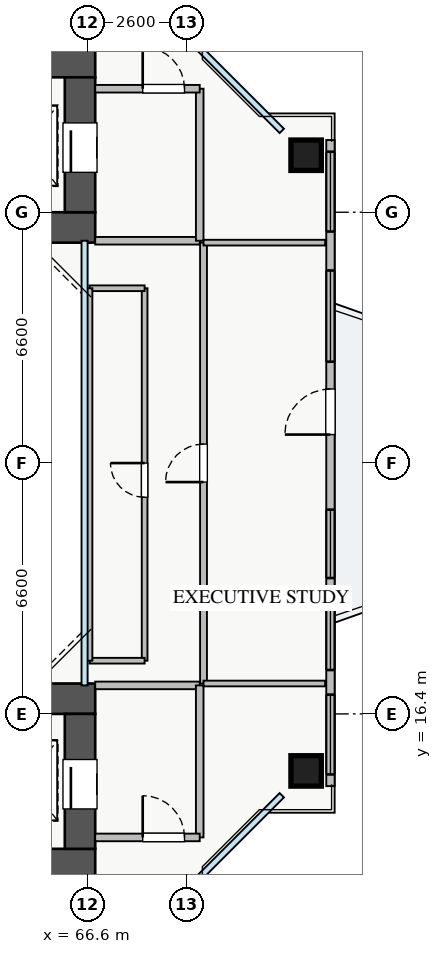
"""IFC4 building model, lengths in metres.
Left out: names, types, materials, properties, quantities, classifications, styles, units other than length and angle.
Written with IfcOpenShell. Run it as: python <this file> out.ifc"""

import sys

from ifc_helpers import new_model, si_unit, direction, frame, frame_2d, origin, origin_2d, place, context, subcontext, project, spatial, rectangle, extrude, source, transform, mapped, element, fill, save


model = new_model("IFC4")
c1 = context("Model", 3, precision=1e-05, world=origin(), true_north=direction((0.0, 1.0)))
c2 = subcontext(c1, "Body", "Model", "MODEL_VIEW")
j1 = project(units=[si_unit("LENGTHUNIT", "METRE"), si_unit("PLANEANGLEUNIT", "RADIAN")], contexts=[c1])
p1 = place(None, origin())
s1 = spatial("IfcSite", under=j1, at=p1, CompositionType="ELEMENT")
p2 = place(p1, origin())
s2 = spatial("IfcBuilding", under=s1, at=p2, CompositionType="ELEMENT")
p3 = place(p2, frame((0.0, 0.0, 106.75)))
s3 = spatial("IfcBuildingStorey", under=s2, at=p3, CompositionType="ELEMENT", Elevation=106.75)
p4 = place(p3, frame((54.2, 29.2, 0.0), z_axis=(0.0, 0.0, 1.0), x_axis=(1.0, 0.0, 0.0)))
e1 = element("IfcWall", 1, at=p4, inside=s3, PredefinedType="SHEAR", context=c2, shape_type="SweptSolid", body=[
    extrude(rectangle(XDim=12.6, YDim=0.8, at=frame_2d((6.3, 0.0))), origin(), (0.0, 0.0, 1.0), 3.25),
])
p5 = place(p3, frame((54.2, 33.55, 0.0), z_axis=(0.0, 0.0, 1.0), x_axis=(1.0, 0.0, 0.0)))
e2 = element("IfcWall", 2, at=p5, inside=s3, PredefinedType="SHEAR", context=c2, shape_type="SweptSolid", body=[
    extrude(rectangle(XDim=12.6, YDim=0.8, at=frame_2d((6.3, 0.0))), origin(), (0.0, 0.0, 1.0), 3.25),
])
p6 = place(p5, frame((8.2, 0.0, 0.0)))
e3 = element("IfcOpeningElement", 3, at=p6, cuts=e2, PredefinedType="OPENING", context=c2, shape_type="SweptSolid", body=[
    extrude(rectangle(XDim=1.1, YDim=2.05, at=frame_2d((0.55, 1.025))), frame((0.0, 0.41, 0.0), z_axis=(0.0, -1.0, 0.0), x_axis=(1.0, 0.0, 0.0)), (0.0, 0.0, 1.0), 0.82),
])
p7 = place(p3, frame((66.4, 29.6, 0.0), z_axis=(0.0, 0.0, 1.0), x_axis=(0.0, 1.0, 0.0)))
e4 = element("IfcWall", 4, at=p7, inside=s3, PredefinedType="SHEAR", context=c2, shape_type="SweptSolid", body=[
    extrude(rectangle(XDim=3.55, YDim=0.8, at=frame_2d((1.775, 0.0))), origin(), (0.0, 0.0, 1.0), 3.25),
])
p8 = place(p7, frame((1.05, 0.0, 0.0)))
e5 = element("IfcOpeningElement", 5, at=p8, cuts=e4, PredefinedType="OPENING", context=c2, shape_type="SweptSolid", body=[
    extrude(rectangle(XDim=1.3, YDim=2.05, at=frame_2d((0.65, 1.025))), frame((0.0, 0.41, 0.0), z_axis=(0.0, -1.0, 0.0), x_axis=(1.0, 0.0, 0.0)), (0.0, 0.0, 1.0), 0.82),
])
p9 = place(p3, frame((54.2, 12.45, 0.0), z_axis=(0.0, 0.0, 1.0), x_axis=(1.0, 0.0, 0.0)))
e6 = element("IfcWall", 6, at=p9, inside=s3, PredefinedType="SHEAR", context=c2, shape_type="SweptSolid", body=[
    extrude(rectangle(XDim=12.6, YDim=0.8, at=frame_2d((6.3, 0.0))), origin(), (0.0, 0.0, 1.0), 3.25),
])
p10 = place(p9, frame((8.2, 0.0, 0.0)))
e7 = element("IfcOpeningElement", 7, at=p10, cuts=e6, PredefinedType="OPENING", context=c2, shape_type="SweptSolid", body=[
    extrude(rectangle(XDim=1.1, YDim=2.05, at=frame_2d((0.55, 1.025))), frame((0.0, 0.41, 0.0), z_axis=(0.0, -1.0, 0.0), x_axis=(1.0, 0.0, 0.0)), (0.0, 0.0, 1.0), 0.82),
])
p11 = place(p3, frame((54.2, 16.8, 0.0), z_axis=(0.0, 0.0, 1.0), x_axis=(1.0, 0.0, 0.0)))
e8 = element("IfcWall", 8, at=p11, inside=s3, PredefinedType="SHEAR", context=c2, shape_type="SweptSolid", body=[
    extrude(rectangle(XDim=12.6, YDim=0.8, at=frame_2d((6.3, 0.0))), origin(), (0.0, 0.0, 1.0), 3.25),
])
p12 = place(p3, frame((66.4, 12.85, 0.0), z_axis=(0.0, 0.0, 1.0), x_axis=(0.0, 1.0, 0.0)))
e9 = element("IfcWall", 9, at=p12, inside=s3, PredefinedType="SHEAR", context=c2, shape_type="SweptSolid", body=[
    extrude(rectangle(XDim=3.55, YDim=0.8, at=frame_2d((1.775, 0.0))), origin(), (0.0, 0.0, 1.0), 3.25),
])
p13 = place(p12, frame((1.05, 0.0, 0.0)))
e10 = element("IfcOpeningElement", 10, at=p13, cuts=e9, PredefinedType="OPENING", context=c2, shape_type="SweptSolid", body=[
    extrude(rectangle(XDim=1.3, YDim=2.05, at=frame_2d((0.65, 1.025))), frame((0.0, 0.41, 0.0), z_axis=(0.0, -1.0, 0.0), x_axis=(1.0, 0.0, 0.0)), (0.0, 0.0, 1.0), 0.82),
])
m1 = source(origin(), c2, "Body", "SweptSolid", [
    extrude(rectangle(XDim=0.8, YDim=0.8, at=origin_2d()), origin(), (0.0, 0.0, 1.0), 3.25),
])
for number, where, z_axis, x_axis in (
    (11, (72.35, 14.9, 0.0), (0.0, 0.0, 1.0), (1.0, 0.0, 0.0)),
    (12, (72.35, 31.1, 0.0), (0.0, 0.0, 1.0), (1.0, 0.0, 0.0)),
):
    element("IfcColumn", number, at=place(p3, frame(where, z_axis=z_axis, x_axis=x_axis)), inside=s3, PredefinedType="COLUMN", context=c2, shape_type="MappedRepresentation", body=[
        mapped(m1, transform((0.0, 0.0, 0.0), x_axis=(1.0, 0.0, 0.0), y_axis=(0.0, 1.0, 0.0), z_axis=(0.0, 0.0, 1.0), scale=1.0)),
    ])
p14 = place(p3, frame((72.99, 14.5, 0.0), z_axis=(0.0, 0.0, 1.0), x_axis=(0.0, 1.0, 0.0)))
e13 = element("IfcWall", 13, at=p14, inside=s3, PredefinedType="STANDARD", context=c2, shape_type="SweptSolid", body=[
    extrude(rectangle(XDim=17.0, YDim=0.22, at=frame_2d((8.5, 0.0))), origin(), (0.0, 0.0, 1.0), 2.61),
])
p15 = place(p14, frame((9.25, 0.0, 0.0)))
e14 = element("IfcOpeningElement", 14, at=p15, cuts=e13, PredefinedType="OPENING", context=c2, shape_type="SweptSolid", body=[
    extrude(rectangle(XDim=1.2, YDim=2.1, at=frame_2d((0.6, 1.05))), frame((0.0, 0.12, 0.0), z_axis=(0.0, -1.0, 0.0), x_axis=(1.0, 0.0, 0.0)), (0.0, 0.0, 1.0), 0.24),
])
p16 = place(p14, frame((0.308, 0.0, 0.9)))
e15 = element("IfcOpeningElement", 15, at=p16, cuts=e13, PredefinedType="OPENING", context=c2, shape_type="SweptSolid", body=[
    extrude(rectangle(XDim=2.1, YDim=1.5, at=frame_2d((1.05, 0.75))), frame((0.0, 0.12, 0.0), z_axis=(0.0, -1.0, 0.0), x_axis=(1.0, 0.0, 0.0)), (0.0, 0.0, 1.0), 0.24),
])
p17 = place(p14, frame((5.475, 0.0, 0.9)))
e16 = element("IfcOpeningElement", 16, at=p17, cuts=e13, PredefinedType="OPENING", context=c2, shape_type="SweptSolid", body=[
    extrude(rectangle(XDim=1.8, YDim=1.45, at=frame_2d((0.9, 0.725))), frame((0.0, 0.12, 0.0), z_axis=(0.0, -1.0, 0.0), x_axis=(1.0, 0.0, 0.0)), (0.0, 0.0, 1.0), 0.24),
])
p18 = place(p14, frame((14.593, 0.0, 0.9)))
e17 = element("IfcOpeningElement", 17, at=p18, cuts=e13, PredefinedType="OPENING", context=c2, shape_type="SweptSolid", body=[
    extrude(rectangle(XDim=2.1, YDim=1.5, at=frame_2d((1.05, 0.75))), frame((0.0, 0.12, 0.0), z_axis=(0.0, -1.0, 0.0), x_axis=(1.0, 0.0, 0.0)), (0.0, 0.0, 1.0), 0.24),
])
p19 = place(p14, frame((3.055, 0.0, 0.9)))
e18 = element("IfcOpeningElement", 18, at=p19, cuts=e13, PredefinedType="OPENING", context=c2, shape_type="SweptSolid", body=[
    extrude(rectangle(XDim=2.1, YDim=1.5, at=frame_2d((1.05, 0.75))), frame((0.0, 0.12, 0.0), z_axis=(0.0, -1.0, 0.0), x_axis=(1.0, 0.0, 0.0)), (0.0, 0.0, 1.0), 0.24),
])
p20 = place(p14, frame((11.167, 0.0, 0.9)))
e19 = element("IfcOpeningElement", 19, at=p20, cuts=e13, PredefinedType="OPENING", context=c2, shape_type="SweptSolid", body=[
    extrude(rectangle(XDim=2.4, YDim=1.5, at=frame_2d((1.2, 0.75))), frame((0.0, 0.12, 0.0), z_axis=(0.0, -1.0, 0.0), x_axis=(1.0, 0.0, 0.0)), (0.0, 0.0, 1.0), 0.24),
])
p21 = place(p3, frame((66.8, 28.85, 0.0), z_axis=(0.0, 0.0, 1.0), x_axis=(1.0, 0.0, 0.0)))
e20 = element("IfcWall", 20, at=p21, inside=s3, PredefinedType="PARTITIONING", context=c2, shape_type="SweptSolid", body=[
    extrude(rectangle(XDim=2.75, YDim=0.2, at=frame_2d((1.375, 0.0))), origin(), (0.0, 0.0, 1.0), 3.07),
])
p22 = place(p3, frame((69.55, 28.85, 0.0), z_axis=(0.0, 0.0, 1.0), x_axis=(0.0, 1.0, 0.0)))
e21 = element("IfcWall", 21, at=p22, inside=s3, PredefinedType="PARTITIONING", context=c2, shape_type="SweptSolid", body=[
    extrude(rectangle(XDim=4.0, YDim=0.2, at=frame_2d((2.0, 0.0))), origin(), (0.0, 0.0, 1.0), 3.07),
])
p23 = place(p3, frame((66.8, 32.85, 0.0), z_axis=(0.0, 0.0, 1.0), x_axis=(1.0, 0.0, 0.0)))
e22 = element("IfcWall", 22, at=p23, inside=s3, PredefinedType="PARTITIONING", context=c2, shape_type="SweptSolid", body=[
    extrude(rectangle(XDim=2.75, YDim=0.2, at=frame_2d((1.375, 0.0))), origin(), (0.0, 0.0, 1.0), 3.07),
])
p24 = place(p23, frame((1.25, 0.0, 0.0)))
e23 = element("IfcOpeningElement", 23, at=p24, cuts=e22, PredefinedType="OPENING", context=c2, shape_type="SweptSolid", body=[
    extrude(rectangle(XDim=1.1, YDim=2.05, at=frame_2d((0.55, 1.025))), frame((0.0, 0.11, 0.0), z_axis=(0.0, -1.0, 0.0), x_axis=(1.0, 0.0, 0.0)), (0.0, 0.0, 1.0), 0.22),
])
p25 = place(p3, frame((66.8, 17.15, 0.0), z_axis=(0.0, 0.0, 1.0), x_axis=(1.0, 0.0, 0.0)))
e24 = element("IfcWall", 24, at=p25, inside=s3, PredefinedType="PARTITIONING", context=c2, shape_type="SweptSolid", body=[
    extrude(rectangle(XDim=2.75, YDim=0.2, at=frame_2d((1.375, 0.0))), origin(), (0.0, 0.0, 1.0), 3.07),
])
p26 = place(p3, frame((69.55, 13.15, 0.0), z_axis=(0.0, 0.0, 1.0), x_axis=(0.0, 1.0, 0.0)))
e25 = element("IfcWall", 25, at=p26, inside=s3, PredefinedType="PARTITIONING", context=c2, shape_type="SweptSolid", body=[
    extrude(rectangle(XDim=4.0, YDim=0.2, at=frame_2d((2.0, 0.0))), origin(), (0.0, 0.0, 1.0), 3.07),
])
p27 = place(p3, frame((66.8, 13.15, 0.0), z_axis=(0.0, 0.0, 1.0), x_axis=(1.0, 0.0, 0.0)))
e26 = element("IfcWall", 26, at=p27, inside=s3, PredefinedType="PARTITIONING", context=c2, shape_type="SweptSolid", body=[
    extrude(rectangle(XDim=2.75, YDim=0.2, at=frame_2d((1.375, 0.0))), origin(), (0.0, 0.0, 1.0), 3.07),
])
p28 = place(p27, frame((1.25, 0.0, 0.0)))
e27 = element("IfcOpeningElement", 27, at=p28, cuts=e26, PredefinedType="OPENING", context=c2, shape_type="SweptSolid", body=[
    extrude(rectangle(XDim=1.1, YDim=2.05, at=frame_2d((0.55, 1.025))), frame((0.0, 0.11, 0.0), z_axis=(0.0, -1.0, 0.0), x_axis=(1.0, 0.0, 0.0)), (0.0, 0.0, 1.0), 0.22),
])
p29 = place(p3, frame((69.65, 17.2, 0.0), z_axis=(0.0, 0.0, 1.0), x_axis=(0.0, 1.0, 0.0)))
e28 = element("IfcWall", 28, at=p29, inside=s3, PredefinedType="PARTITIONING", context=c2, shape_type="SweptSolid", body=[
    extrude(rectangle(XDim=11.6, YDim=0.18, at=frame_2d((5.8, 0.0))), origin(), (0.0, 0.0, 1.0), 3.07),
])
p30 = place(p29, frame((5.3, 0.0, 0.0)))
e29 = element("IfcOpeningElement", 29, at=p30, cuts=e28, PredefinedType="OPENING", context=c2, shape_type="SweptSolid", body=[
    extrude(rectangle(XDim=1.0, YDim=2.05, at=frame_2d((0.5, 1.025))), frame((0.0, 0.1, 0.0), z_axis=(0.0, -1.0, 0.0), x_axis=(1.0, 0.0, 0.0)), (0.0, 0.0, 1.0), 0.2),
])
for number, where, z_axis, x_axis in (
    (30, (69.65, 17.2, 0.0), (0.0, 0.0, 1.0), (1.0, 0.0, 0.0)),
    (31, (69.65, 28.8, 0.0), (0.0, 0.0, 1.0), (1.0, 0.0, 0.0)),
):
    element("IfcWall", number, at=place(p3, frame(where, z_axis=z_axis, x_axis=x_axis)), inside=s3, PredefinedType="PARTITIONING", context=c2, shape_type="SweptSolid", body=[
        extrude(rectangle(XDim=3.2, YDim=0.15, at=frame_2d((1.6, 0.0))), origin(), (0.0, 0.0, 1.0), 3.07),
    ])
p31 = place(p3, frame((68.1, 17.8, 0.0), z_axis=(0.0, 0.0, 1.0), x_axis=(0.0, 1.0, 0.0)))
e32 = element("IfcWall", 32, at=p31, inside=s3, PredefinedType="PARTITIONING", context=c2, shape_type="SweptSolid", body=[
    extrude(rectangle(XDim=9.8, YDim=0.15, at=frame_2d((4.9, 0.0))), origin(), (0.0, 0.0, 1.0), 3.07),
])
p32 = place(p31, frame((4.3, 0.0, 0.0)))
e33 = element("IfcOpeningElement", 33, at=p32, cuts=e32, PredefinedType="OPENING", context=c2, shape_type="SweptSolid", body=[
    extrude(rectangle(XDim=0.9, YDim=2.05, at=frame_2d((0.45, 1.025))), frame((0.0, 0.085, 0.0), z_axis=(0.0, -1.0, 0.0), x_axis=(1.0, 0.0, 0.0)), (0.0, 0.0, 1.0), 0.17),
])
p33 = place(p3, frame((66.65, 27.6, 0.0), z_axis=(0.0, 0.0, 1.0), x_axis=(1.0, 0.0, 0.0)))
e34 = element("IfcWall", 34, at=p33, inside=s3, PredefinedType="PARTITIONING", context=c2, shape_type="SweptSolid", body=[
    extrude(rectangle(XDim=1.45, YDim=0.15, at=frame_2d((0.725, 0.0))), origin(), (0.0, 0.0, 1.0), 2.815),
])
p34 = place(p3, frame((66.65, 17.8, 0.0), z_axis=(0.0, 0.0, 1.0), x_axis=(1.0, 0.0, 0.0)))
e35 = element("IfcWall", 35, at=p34, inside=s3, PredefinedType="PARTITIONING", context=c2, shape_type="SweptSolid", body=[
    extrude(rectangle(XDim=1.45, YDim=0.15, at=frame_2d((0.725, 0.0))), origin(), (0.0, 0.0, 1.0), 3.07),
])
p35 = place(p3, frame((66.65, 17.8, 0.0), z_axis=(0.0, 0.0, 1.0), x_axis=(0.0, 1.0, 0.0)))
e36 = element("IfcWall", 36, at=p35, inside=s3, PredefinedType="PARTITIONING", context=c2, shape_type="SweptSolid", body=[
    extrude(rectangle(XDim=9.8, YDim=0.15, at=frame_2d((4.9, 0.0))), origin(), (0.0, 0.0, 1.0), 2.665),
])
m2 = source(origin(), c2, "Body", "SweptSolid", [
    extrude(rectangle(XDim=1.2, YDim=2.1, at=frame_2d((0.6, 1.05))), frame((0.0, 0.025, 0.0), z_axis=(0.0, -1.0, 0.0), x_axis=(1.0, 0.0, 0.0)), (0.0, 0.0, 1.0), 0.05),
])
p36 = place(p15, origin())
e37 = element("IfcDoor", 37, at=p36, inside=s3, OperationType="SINGLE_SWING_LEFT", PredefinedType="DOOR", context=c2, shape_type="MappedRepresentation", body=[
    mapped(m2, transform((0.0, 0.0, 0.0), x_axis=(1.0, 0.0, 0.0), y_axis=(0.0, 1.0, 0.0), z_axis=(0.0, 0.0, 1.0), scale=1.0)),
])
fill(e14, e37)
m3 = source(origin(), c2, "Body", "SweptSolid", [
    extrude(rectangle(XDim=2.1, YDim=1.5, at=frame_2d((1.05, 0.75))), frame((0.0, 0.03, 0.0), z_axis=(0.0, -1.0, 0.0), x_axis=(1.0, 0.0, 0.0)), (0.0, 0.0, 1.0), 0.06),
])
p37 = place(p16, origin())
e38 = element("IfcWindow", 38, at=p37, inside=s3, PartitioningType="TRIPLE_PANEL_VERTICAL", PredefinedType="WINDOW", context=c2, shape_type="MappedRepresentation", body=[
    mapped(m3, transform((0.0, 0.0, 0.0), x_axis=(1.0, 0.0, 0.0), y_axis=(0.0, 1.0, 0.0), z_axis=(0.0, 0.0, 1.0), scale=1.0)),
])
fill(e15, e38)
m4 = source(origin(), c2, "Body", "SweptSolid", [
    extrude(rectangle(XDim=1.8, YDim=1.45, at=frame_2d((0.9, 0.725))), frame((0.0, 0.03, 0.0), z_axis=(0.0, -1.0, 0.0), x_axis=(1.0, 0.0, 0.0)), (0.0, 0.0, 1.0), 0.06),
])
p38 = place(p17, origin())
e39 = element("IfcWindow", 39, at=p38, inside=s3, PartitioningType="DOUBLE_PANEL_VERTICAL", PredefinedType="WINDOW", context=c2, shape_type="MappedRepresentation", body=[
    mapped(m4, transform((0.0, 0.0, 0.0), x_axis=(1.0, 0.0, 0.0), y_axis=(0.0, 1.0, 0.0), z_axis=(0.0, 0.0, 1.0), scale=1.0)),
])
fill(e16, e39)
p39 = place(p18, origin())
e40 = element("IfcWindow", 40, at=p39, inside=s3, PartitioningType="TRIPLE_PANEL_VERTICAL", PredefinedType="WINDOW", context=c2, shape_type="MappedRepresentation", body=[
    mapped(m3, transform((0.0, 0.0, 0.0), x_axis=(1.0, 0.0, 0.0), y_axis=(0.0, 1.0, 0.0), z_axis=(0.0, 0.0, 1.0), scale=1.0)),
])
fill(e17, e40)
m5 = source(origin(), c2, "Body", "SweptSolid", [
    extrude(rectangle(XDim=1.3, YDim=2.05, at=frame_2d((0.65, 1.025))), frame((0.0, 0.025, 0.0), z_axis=(0.0, -1.0, 0.0), x_axis=(1.0, 0.0, 0.0)), (0.0, 0.0, 1.0), 0.05),
])
p40 = place(p8, origin())
e41 = element("IfcDoor", 41, at=p40, inside=s3, OperationType="SLIDING_TO_LEFT", PredefinedType="DOOR", context=c2, shape_type="MappedRepresentation", body=[
    mapped(m5, transform((0.0, 0.0, 0.0), x_axis=(1.0, 0.0, 0.0), y_axis=(0.0, 1.0, 0.0), z_axis=(0.0, 0.0, 1.0), scale=1.0)),
])
fill(e5, e41)
p41 = place(p13, origin())
e42 = element("IfcDoor", 42, at=p41, inside=s3, OperationType="SLIDING_TO_RIGHT", PredefinedType="DOOR", context=c2, shape_type="MappedRepresentation", body=[
    mapped(m5, transform((0.0, 0.0, 0.0), x_axis=(1.0, 0.0, 0.0), y_axis=(0.0, 1.0, 0.0), z_axis=(0.0, 0.0, 1.0), scale=1.0)),
])
fill(e10, e42)
m6 = source(origin(), c2, "Body", "SweptSolid", [
    extrude(rectangle(XDim=1.1, YDim=2.05, at=frame_2d((0.55, 1.025))), frame((0.0, 0.025, 0.0), z_axis=(0.0, -1.0, 0.0), x_axis=(1.0, 0.0, 0.0)), (0.0, 0.0, 1.0), 0.05),
])
p42 = place(p24, origin())
e43 = element("IfcDoor", 43, at=p42, inside=s3, OperationType="SINGLE_SWING_LEFT", PredefinedType="DOOR", context=c2, shape_type="MappedRepresentation", body=[
    mapped(m6, transform((0.0, 0.0, 0.0), x_axis=(1.0, 0.0, 0.0), y_axis=(0.0, 1.0, 0.0), z_axis=(0.0, 0.0, 1.0), scale=1.0)),
])
fill(e23, e43)
p43 = place(p28, origin())
e44 = element("IfcDoor", 44, at=p43, inside=s3, OperationType="SINGLE_SWING_LEFT", PredefinedType="DOOR", context=c2, shape_type="MappedRepresentation", body=[
    mapped(m6, transform((0.0, 0.0, 0.0), x_axis=(1.0, 0.0, 0.0), y_axis=(0.0, 1.0, 0.0), z_axis=(0.0, 0.0, 1.0), scale=1.0)),
])
fill(e27, e44)
m7 = source(origin(), c2, "Body", "SweptSolid", [
    extrude(rectangle(XDim=1.0, YDim=2.05, at=frame_2d((0.5, 1.025))), frame((0.0, 0.025, 0.0), z_axis=(0.0, -1.0, 0.0), x_axis=(1.0, 0.0, 0.0)), (0.0, 0.0, 1.0), 0.05),
])
p44 = place(p30, origin())
e45 = element("IfcDoor", 45, at=p44, inside=s3, OperationType="SINGLE_SWING_LEFT", PredefinedType="DOOR", context=c2, shape_type="MappedRepresentation", body=[
    mapped(m7, transform((0.0, 0.0, 0.0), x_axis=(1.0, 0.0, 0.0), y_axis=(0.0, 1.0, 0.0), z_axis=(0.0, 0.0, 1.0), scale=1.0)),
])
fill(e29, e45)
m8 = source(origin(), c2, "Body", "SweptSolid", [
    extrude(rectangle(XDim=0.9, YDim=2.05, at=frame_2d((0.45, 1.025))), frame((0.0, 0.025, 0.0), z_axis=(0.0, -1.0, 0.0), x_axis=(1.0, 0.0, 0.0)), (0.0, 0.0, 1.0), 0.05),
])
p45 = place(p32, origin())
e46 = element("IfcDoor", 46, at=p45, inside=s3, OperationType="SINGLE_SWING_RIGHT", PredefinedType="DOOR", context=c2, shape_type="MappedRepresentation", body=[
    mapped(m8, transform((0.0, 0.0, 0.0), x_axis=(1.0, 0.0, 0.0), y_axis=(0.0, 1.0, 0.0), z_axis=(0.0, 0.0, 1.0), scale=1.0)),
])
fill(e33, e46)
p46 = place(p19, origin())
e47 = element("IfcWindow", 47, at=p46, inside=s3, PartitioningType="TRIPLE_PANEL_VERTICAL", PredefinedType="WINDOW", context=c2, shape_type="MappedRepresentation", body=[
    mapped(m3, transform((0.0, 0.0, 0.0), x_axis=(1.0, 0.0, 0.0), y_axis=(0.0, 1.0, 0.0), z_axis=(0.0, 0.0, 1.0), scale=1.0)),
])
fill(e18, e47)
m9 = source(origin(), c2, "Body", "SweptSolid", [
    extrude(rectangle(XDim=2.4, YDim=1.5, at=frame_2d((1.2, 0.75))), frame((0.0, 0.03, 0.0), z_axis=(0.0, -1.0, 0.0), x_axis=(1.0, 0.0, 0.0)), (0.0, 0.0, 1.0), 0.06),
])
p47 = place(p20, origin())
e48 = element("IfcWindow", 48, at=p47, inside=s3, PartitioningType="TRIPLE_PANEL_VERTICAL", PredefinedType="WINDOW", context=c2, shape_type="MappedRepresentation", body=[
    mapped(m9, transform((0.0, 0.0, 0.0), x_axis=(1.0, 0.0, 0.0), y_axis=(0.0, 1.0, 0.0), z_axis=(0.0, 0.0, 1.0), scale=1.0)),
])
fill(e19, e48)
save(model, sys.argv[1])
